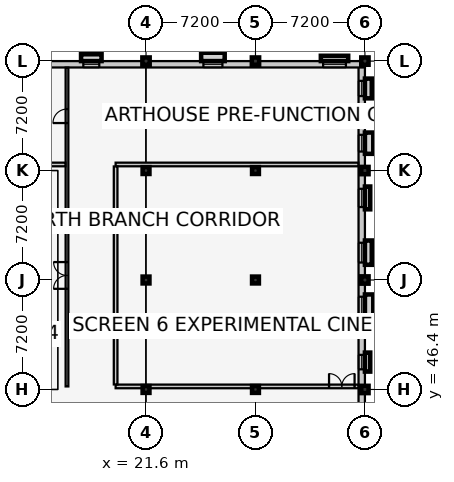
"""IFC4 building model, lengths in metres.
Left out: names, types, materials, properties, quantities, classifications, styles, units other than length and angle.
Written with IfcOpenShell. Run it as: python <this file> out.ifc"""

import sys

from ifc_helpers import new_model, si_unit, direction, frame, frame_2d, origin, origin_2d, place, context, subcontext, project, spatial, rectangle, extrude, element, fill, save


model = new_model("IFC4")
c1 = context("Model", 3, precision=1e-05, world=origin(), true_north=direction((0.0, 1.0)))
c2 = subcontext(c1, "Body", "Model", "MODEL_VIEW")
j1 = project(units=[si_unit("LENGTHUNIT", "METRE"), si_unit("PLANEANGLEUNIT", "RADIAN")], contexts=[c1])
p1 = place(None, origin())
s1 = spatial("IfcSite", under=j1, at=p1, CompositionType="ELEMENT")
p2 = place(p1, origin())
s2 = spatial("IfcBuilding", under=s1, at=p2, CompositionType="ELEMENT")
p3 = place(p2, frame((0.0, 0.0, 9.6)))
s3 = spatial("IfcBuildingStorey", under=s2, at=p3, CompositionType="ELEMENT", Elevation=9.6)
for number, where, z_axis, x_axis in (
    (1, (21.6, 46.4, 0.0), (0.0, 0.0, 1.0), (1.0, 0.0, 0.0)),
    (2, (21.6, 53.6, 0.0), (0.0, 0.0, 1.0), (1.0, 0.0, 0.0)),
    (3, (21.6, 60.8, 0.0), (0.0, 0.0, 1.0), (1.0, 0.0, 0.0)),
):
    element("IfcColumn", number, at=place(p3, frame(where, z_axis=z_axis, x_axis=x_axis)), inside=s3, PredefinedType="COLUMN", context=c2, shape_type="SweptSolid", body=[
        extrude(rectangle(XDim=0.45, YDim=0.45, at=origin_2d()), origin(), (0.0, 0.0, 1.0), 4.2),
    ])
p4 = place(p3, frame((21.6, 68.0, 0.0), z_axis=(0.0, 0.0, 1.0), x_axis=(1.0, 0.0, 0.0)))
e4 = element("IfcColumn", 4, at=p4, inside=s3, PredefinedType="COLUMN", context=c2, shape_type="SweptSolid", body=[
    extrude(rectangle(XDim=0.48, YDim=0.48, at=origin_2d()), origin(), (0.0, 0.0, 1.0), 4.2),
])
for number, where, z_axis, x_axis in (
    (5, (28.8, 46.4, 0.0), (0.0, 0.0, 1.0), (1.0, 0.0, 0.0)),
    (6, (28.8, 53.6, 0.0), (0.0, 0.0, 1.0), (1.0, 0.0, 0.0)),
    (7, (28.8, 60.8, 0.0), (0.0, 0.0, 1.0), (1.0, 0.0, 0.0)),
):
    element("IfcColumn", number, at=place(p3, frame(where, z_axis=z_axis, x_axis=x_axis)), inside=s3, PredefinedType="COLUMN", context=c2, shape_type="SweptSolid", body=[
        extrude(rectangle(XDim=0.45, YDim=0.45, at=origin_2d()), origin(), (0.0, 0.0, 1.0), 4.2),
    ])
for number, where, z_axis, x_axis in (
    (8, (28.8, 68.0, 0.0), (0.0, 0.0, 1.0), (1.0, 0.0, 0.0)),
    (9, (36.0, 46.4, 0.0), (0.0, 0.0, 1.0), (1.0, 0.0, 0.0)),
    (10, (36.0, 53.6, 0.0), (0.0, 0.0, 1.0), (1.0, 0.0, 0.0)),
    (11, (36.0, 60.8, 0.0), (0.0, 0.0, 1.0), (1.0, 0.0, 0.0)),
    (12, (36.0, 68.0, 0.0), (0.0, 0.0, 1.0), (1.0, 0.0, 0.0)),
):
    element("IfcColumn", number, at=place(p3, frame(where, z_axis=z_axis, x_axis=x_axis)), inside=s3, PredefinedType="COLUMN", context=c2, shape_type="SweptSolid", body=[
        extrude(rectangle(XDim=0.48, YDim=0.48, at=origin_2d()), origin(), (0.0, 0.0, 1.0), 4.2),
    ])
p5 = place(p3, frame((35.79, 68.0, 0.0), z_axis=(0.0, 0.0, 1.0), x_axis=(0.0, -1.0, 0.0)))
e13 = element("IfcWall", 13, at=p5, inside=s3, PredefinedType="SOLIDWALL", context=c2, shape_type="SweptSolid", body=[
    extrude(rectangle(XDim=28.8, YDim=0.42, at=frame_2d((14.4, 0.0))), origin(), (0.0, 0.0, 1.0), 3.345),
])
p6 = place(p5, frame((1.3, 0.0, 0.9)))
e14 = element("IfcOpeningElement", 14, at=p6, cuts=e13, PredefinedType="OPENING", context=c2, shape_type="SweptSolid", body=[
    extrude(rectangle(XDim=1.0, YDim=1.35, at=frame_2d((0.5, 0.675))), frame((0.0, 0.222, 0.0), z_axis=(0.0, -1.0, 0.0), x_axis=(1.0, 0.0, 0.0)), (0.0, 0.0, 1.0), 0.444),
])
p7 = place(p5, frame((4.85, 0.0, 0.9)))
e15 = element("IfcOpeningElement", 15, at=p7, cuts=e13, PredefinedType="OPENING", context=c2, shape_type="SweptSolid", body=[
    extrude(rectangle(XDim=1.1, YDim=1.35, at=frame_2d((0.55, 0.675))), frame((0.0, 0.222, 0.0), z_axis=(0.0, -1.0, 0.0), x_axis=(1.0, 0.0, 0.0)), (0.0, 0.0, 1.0), 0.444),
])
p8 = place(p5, frame((8.4, 0.0, 0.9)))
e16 = element("IfcOpeningElement", 16, at=p8, cuts=e13, PredefinedType="OPENING", context=c2, shape_type="SweptSolid", body=[
    extrude(rectangle(XDim=1.2, YDim=1.35, at=frame_2d((0.6, 0.675))), frame((0.0, 0.222, 0.0), z_axis=(0.0, -1.0, 0.0), x_axis=(1.0, 0.0, 0.0)), (0.0, 0.0, 1.0), 0.444),
])
p9 = place(p5, frame((11.95, 0.0, 0.9)))
e17 = element("IfcOpeningElement", 17, at=p9, cuts=e13, PredefinedType="OPENING", context=c2, shape_type="SweptSolid", body=[
    extrude(rectangle(XDim=1.3, YDim=1.35, at=frame_2d((0.65, 0.675))), frame((0.0, 0.222, 0.0), z_axis=(0.0, -1.0, 0.0), x_axis=(1.0, 0.0, 0.0)), (0.0, 0.0, 1.0), 0.444),
])
p10 = place(p5, frame((15.5, 0.0, 0.9)))
e18 = element("IfcOpeningElement", 18, at=p10, cuts=e13, PredefinedType="OPENING", context=c2, shape_type="SweptSolid", body=[
    extrude(rectangle(XDim=1.4, YDim=1.35, at=frame_2d((0.7, 0.675))), frame((0.0, 0.222, 0.0), z_axis=(0.0, -1.0, 0.0), x_axis=(1.0, 0.0, 0.0)), (0.0, 0.0, 1.0), 0.444),
])
p11 = place(p5, frame((19.325, 0.0, 0.9)))
e19 = element("IfcOpeningElement", 19, at=p11, cuts=e13, PredefinedType="OPENING", context=c2, shape_type="SweptSolid", body=[
    extrude(rectangle(XDim=0.95, YDim=1.45, at=frame_2d((0.475, 0.725))), frame((0.0, 0.222, 0.0), z_axis=(0.0, -1.0, 0.0), x_axis=(1.0, 0.0, 0.0)), (0.0, 0.0, 1.0), 0.444),
])
p12 = place(p5, frame((26.425, 0.0, 0.9)))
e20 = element("IfcOpeningElement", 20, at=p12, cuts=e13, PredefinedType="OPENING", context=c2, shape_type="SweptSolid", body=[
    extrude(rectangle(XDim=1.15, YDim=1.45, at=frame_2d((0.575, 0.725))), frame((0.0, 0.222, 0.0), z_axis=(0.0, -1.0, 0.0), x_axis=(1.0, 0.0, 0.0)), (0.0, 0.0, 1.0), 0.444),
])
p13 = place(p3, frame((0.0, 67.79, 0.0), z_axis=(0.0, 0.0, 1.0), x_axis=(1.0, 0.0, 0.0)))
e21 = element("IfcWall", 21, at=p13, inside=s3, PredefinedType="SOLIDWALL", context=c2, shape_type="SweptSolid", body=[
    extrude(rectangle(XDim=36.0, YDim=0.42, at=frame_2d((18.0, 0.0))), origin(), (0.0, 0.0, 1.0), 3.245),
])
p14 = place(p13, frame((1.375, 0.0, 0.9)))
e22 = element("IfcOpeningElement", 22, at=p14, cuts=e21, PredefinedType="OPENING", context=c2, shape_type="SweptSolid", body=[
    extrude(rectangle(XDim=1.25, YDim=1.45, at=frame_2d((0.625, 0.725))), frame((0.0, 0.222, 0.0), z_axis=(0.0, -1.0, 0.0), x_axis=(1.0, 0.0, 0.0)), (0.0, 0.0, 1.0), 0.444),
])
p15 = place(p13, frame((9.275, 0.0, 0.9)))
e23 = element("IfcOpeningElement", 23, at=p15, cuts=e21, PredefinedType="OPENING", context=c2, shape_type="SweptSolid", body=[
    extrude(rectangle(XDim=1.45, YDim=1.45, at=frame_2d((0.725, 0.725))), frame((0.0, 0.222, 0.0), z_axis=(0.0, -1.0, 0.0), x_axis=(1.0, 0.0, 0.0)), (0.0, 0.0, 1.0), 0.444),
])
p16 = place(p13, frame((17.475, 0.0, 0.9)))
e24 = element("IfcOpeningElement", 24, at=p16, cuts=e21, PredefinedType="OPENING", context=c2, shape_type="SweptSolid", body=[
    extrude(rectangle(XDim=1.05, YDim=1.6, at=frame_2d((0.525, 0.8))), frame((0.0, 0.222, 0.0), z_axis=(0.0, -1.0, 0.0), x_axis=(1.0, 0.0, 0.0)), (0.0, 0.0, 1.0), 0.444),
])
p17 = place(p13, frame((25.375, 0.0, 0.9)))
e25 = element("IfcOpeningElement", 25, at=p17, cuts=e21, PredefinedType="OPENING", context=c2, shape_type="SweptSolid", body=[
    extrude(rectangle(XDim=1.25, YDim=1.6, at=frame_2d((0.625, 0.8))), frame((0.0, 0.222, 0.0), z_axis=(0.0, -1.0, 0.0), x_axis=(1.0, 0.0, 0.0)), (0.0, 0.0, 1.0), 0.444),
])
p18 = place(p13, frame((33.25, 0.0, 0.9)))
e26 = element("IfcOpeningElement", 26, at=p18, cuts=e21, PredefinedType="OPENING", context=c2, shape_type="SweptSolid", body=[
    extrude(rectangle(XDim=1.5, YDim=1.6, at=frame_2d((0.75, 0.8))), frame((0.0, 0.222, 0.0), z_axis=(0.0, -1.0, 0.0), x_axis=(1.0, 0.0, 0.0)), (0.0, 0.0, 1.0), 0.444),
])
p19 = place(p3, frame((16.4, 46.6, 0.0), z_axis=(0.0, 0.0, 1.0), x_axis=(0.0, 1.0, 0.0)))
e27 = element("IfcWall", 27, at=p19, inside=s3, PredefinedType="PARTITIONING", context=c2, shape_type="SweptSolid", body=[
    extrude(rectangle(XDim=20.97, YDim=0.18, at=frame_2d((10.485, 0.0))), origin(), (0.0, 0.0, 1.0), 3.95),
])
p20 = place(p19, frame((6.42, 0.0, 0.0)))
e28 = element("IfcOpeningElement", 28, at=p20, cuts=e27, PredefinedType="OPENING", context=c2, shape_type="SweptSolid", body=[
    extrude(rectangle(XDim=1.76, YDim=2.3, at=frame_2d((0.88, 1.15))), frame((0.0, 0.102, 0.0), z_axis=(0.0, -1.0, 0.0), x_axis=(1.0, 0.0, 0.0)), (0.0, 0.0, 1.0), 0.204),
])
p21 = place(p19, frame((17.325, 0.0, 0.0)))
e29 = element("IfcOpeningElement", 29, at=p21, cuts=e27, PredefinedType="OPENING", context=c2, shape_type="SweptSolid", body=[
    extrude(rectangle(XDim=0.92, YDim=2.08, at=frame_2d((0.46, 1.04))), frame((0.0, 0.102, 0.0), z_axis=(0.0, -1.0, 0.0), x_axis=(1.0, 0.0, 0.0)), (0.0, 0.0, 1.0), 0.204),
])
p22 = place(p3, frame((0.43, 61.2, 0.0), z_axis=(0.0, 0.0, 1.0), x_axis=(1.0, 0.0, 0.0)))
e30 = element("IfcWall", 30, at=p22, inside=s3, PredefinedType="PARTITIONING", context=c2, shape_type="SweptSolid", body=[
    extrude(rectangle(XDim=15.87, YDim=0.24, at=frame_2d((7.935, 0.0))), origin(), (0.0, 0.0, 1.0), 3.96),
])
p23 = place(p3, frame((19.6, 46.6, 0.0), z_axis=(0.0, 0.0, 1.0), x_axis=(1.0, 0.0, 0.0)))
e31 = element("IfcWall", 31, at=p23, inside=s3, PredefinedType="PARTITIONING", context=c2, shape_type="SweptSolid", body=[
    extrude(rectangle(XDim=15.97, YDim=0.24, at=frame_2d((7.985, 0.0))), origin(), (0.0, 0.0, 1.0), 3.125),
])
p24 = place(p23, frame((14.04, 0.0, 0.0)))
e32 = element("IfcOpeningElement", 32, at=p24, cuts=e31, PredefinedType="OPENING", context=c2, shape_type="SweptSolid", body=[
    extrude(rectangle(XDim=1.68, YDim=2.3, at=frame_2d((0.84, 1.15))), frame((0.0, 0.132, 0.0), z_axis=(0.0, -1.0, 0.0), x_axis=(1.0, 0.0, 0.0)), (0.0, 0.0, 1.0), 0.264),
])
p25 = place(p3, frame((19.6, 61.2, 0.0), z_axis=(0.0, 0.0, 1.0), x_axis=(1.0, 0.0, 0.0)))
e33 = element("IfcWall", 33, at=p25, inside=s3, PredefinedType="PARTITIONING", context=c2, shape_type="SweptSolid", body=[
    extrude(rectangle(XDim=15.97, YDim=0.24, at=frame_2d((7.985, 0.0))), origin(), (0.0, 0.0, 1.0), 3.96),
])
p26 = place(p3, frame((19.6, 46.73, 0.0), z_axis=(0.0, 0.0, 1.0), x_axis=(0.0, 1.0, 0.0)))
e34 = element("IfcWall", 34, at=p26, inside=s3, PredefinedType="PARTITIONING", context=c2, shape_type="SweptSolid", body=[
    extrude(rectangle(XDim=14.34, YDim=0.24, at=frame_2d((7.17, 0.0))), origin(), (0.0, 0.0, 1.0), 3.95),
])
p27 = place(p6, origin())
e35 = element("IfcWindow", 35, at=p27, inside=s3, PartitioningType="SINGLE_PANEL", PredefinedType="WINDOW", context=c2, shape_type="SweptSolid", body=[
    extrude(rectangle(XDim=1.0, YDim=1.35, at=frame_2d((0.5, 0.675))), frame((0.0, 0.03, 0.0), z_axis=(0.0, -1.0, 0.0), x_axis=(1.0, 0.0, 0.0)), (0.0, 0.0, 1.0), 0.06),
])
fill(e14, e35)
p28 = place(p7, origin())
e36 = element("IfcWindow", 36, at=p28, inside=s3, PartitioningType="SINGLE_PANEL", PredefinedType="WINDOW", context=c2, shape_type="SweptSolid", body=[
    extrude(rectangle(XDim=1.1, YDim=1.35, at=frame_2d((0.55, 0.675))), frame((0.0, 0.03, 0.0), z_axis=(0.0, -1.0, 0.0), x_axis=(1.0, 0.0, 0.0)), (0.0, 0.0, 1.0), 0.06),
])
fill(e15, e36)
p29 = place(p8, origin())
e37 = element("IfcWindow", 37, at=p29, inside=s3, PartitioningType="SINGLE_PANEL", PredefinedType="WINDOW", context=c2, shape_type="SweptSolid", body=[
    extrude(rectangle(XDim=1.2, YDim=1.35, at=frame_2d((0.6, 0.675))), frame((0.0, 0.03, 0.0), z_axis=(0.0, -1.0, 0.0), x_axis=(1.0, 0.0, 0.0)), (0.0, 0.0, 1.0), 0.06),
])
fill(e16, e37)
p30 = place(p9, origin())
e38 = element("IfcWindow", 38, at=p30, inside=s3, PartitioningType="SINGLE_PANEL", PredefinedType="WINDOW", context=c2, shape_type="SweptSolid", body=[
    extrude(rectangle(XDim=1.3, YDim=1.35, at=frame_2d((0.65, 0.675))), frame((0.0, 0.03, 0.0), z_axis=(0.0, -1.0, 0.0), x_axis=(1.0, 0.0, 0.0)), (0.0, 0.0, 1.0), 0.06),
])
fill(e17, e38)
p31 = place(p10, origin())
e39 = element("IfcWindow", 39, at=p31, inside=s3, PartitioningType="SINGLE_PANEL", PredefinedType="WINDOW", context=c2, shape_type="SweptSolid", body=[
    extrude(rectangle(XDim=1.4, YDim=1.35, at=frame_2d((0.7, 0.675))), frame((0.0, 0.03, 0.0), z_axis=(0.0, -1.0, 0.0), x_axis=(1.0, 0.0, 0.0)), (0.0, 0.0, 1.0), 0.06),
])
fill(e18, e39)
p32 = place(p11, origin())
e40 = element("IfcWindow", 40, at=p32, inside=s3, PartitioningType="SINGLE_PANEL", PredefinedType="WINDOW", context=c2, shape_type="SweptSolid", body=[
    extrude(rectangle(XDim=0.95, YDim=1.45, at=frame_2d((0.475, 0.725))), frame((0.0, 0.03, 0.0), z_axis=(0.0, -1.0, 0.0), x_axis=(1.0, 0.0, 0.0)), (0.0, 0.0, 1.0), 0.06),
])
fill(e19, e40)
p33 = place(p16, origin())
e41 = element("IfcWindow", 41, at=p33, inside=s3, PartitioningType="SINGLE_PANEL", PredefinedType="WINDOW", context=c2, shape_type="SweptSolid", body=[
    extrude(rectangle(XDim=1.05, YDim=1.6, at=frame_2d((0.525, 0.8))), frame((0.0, 0.03, 0.0), z_axis=(0.0, -1.0, 0.0), x_axis=(1.0, 0.0, 0.0)), (0.0, 0.0, 1.0), 0.06),
])
fill(e24, e41)
p34 = place(p17, origin())
e42 = element("IfcWindow", 42, at=p34, inside=s3, PartitioningType="SINGLE_PANEL", PredefinedType="WINDOW", context=c2, shape_type="SweptSolid", body=[
    extrude(rectangle(XDim=1.25, YDim=1.6, at=frame_2d((0.625, 0.8))), frame((0.0, 0.03, 0.0), z_axis=(0.0, -1.0, 0.0), x_axis=(1.0, 0.0, 0.0)), (0.0, 0.0, 1.0), 0.06),
])
fill(e25, e42)
p35 = place(p18, origin())
e43 = element("IfcWindow", 43, at=p35, inside=s3, PartitioningType="SINGLE_PANEL", PredefinedType="WINDOW", context=c2, shape_type="SweptSolid", body=[
    extrude(rectangle(XDim=1.5, YDim=1.6, at=frame_2d((0.75, 0.8))), frame((0.0, 0.03, 0.0), z_axis=(0.0, -1.0, 0.0), x_axis=(1.0, 0.0, 0.0)), (0.0, 0.0, 1.0), 0.06),
])
fill(e26, e43)
p36 = place(p20, origin())
e44 = element("IfcDoor", 44, at=p36, inside=s3, OperationType="DOUBLE_DOOR_SINGLE_SWING", PredefinedType="DOOR", context=c2, shape_type="SweptSolid", body=[
    extrude(rectangle(XDim=1.76, YDim=2.3, at=frame_2d((0.88, 1.15))), frame((0.0, 0.025, 0.0), z_axis=(0.0, -1.0, 0.0), x_axis=(1.0, 0.0, 0.0)), (0.0, 0.0, 1.0), 0.05),
])
fill(e28, e44)
p37 = place(p24, origin())
e45 = element("IfcDoor", 45, at=p37, inside=s3, OperationType="DOUBLE_DOOR_SINGLE_SWING", PredefinedType="DOOR", context=c2, shape_type="SweptSolid", body=[
    extrude(rectangle(XDim=1.68, YDim=2.3, at=frame_2d((0.84, 1.15))), frame((0.0, 0.025, 0.0), z_axis=(0.0, -1.0, 0.0), x_axis=(1.0, 0.0, 0.0)), (0.0, 0.0, 1.0), 0.05),
])
fill(e32, e45)
p38 = place(p21, origin())
e46 = element("IfcDoor", 46, at=p38, inside=s3, OperationType="SINGLE_SWING_LEFT", PredefinedType="DOOR", context=c2, shape_type="SweptSolid", body=[
    extrude(rectangle(XDim=0.92, YDim=2.08, at=frame_2d((0.46, 1.04))), frame((0.0, 0.025, 0.0), z_axis=(0.0, -1.0, 0.0), x_axis=(1.0, 0.0, 0.0)), (0.0, 0.0, 1.0), 0.05),
])
fill(e29, e46)
save(model, sys.argv[1])
